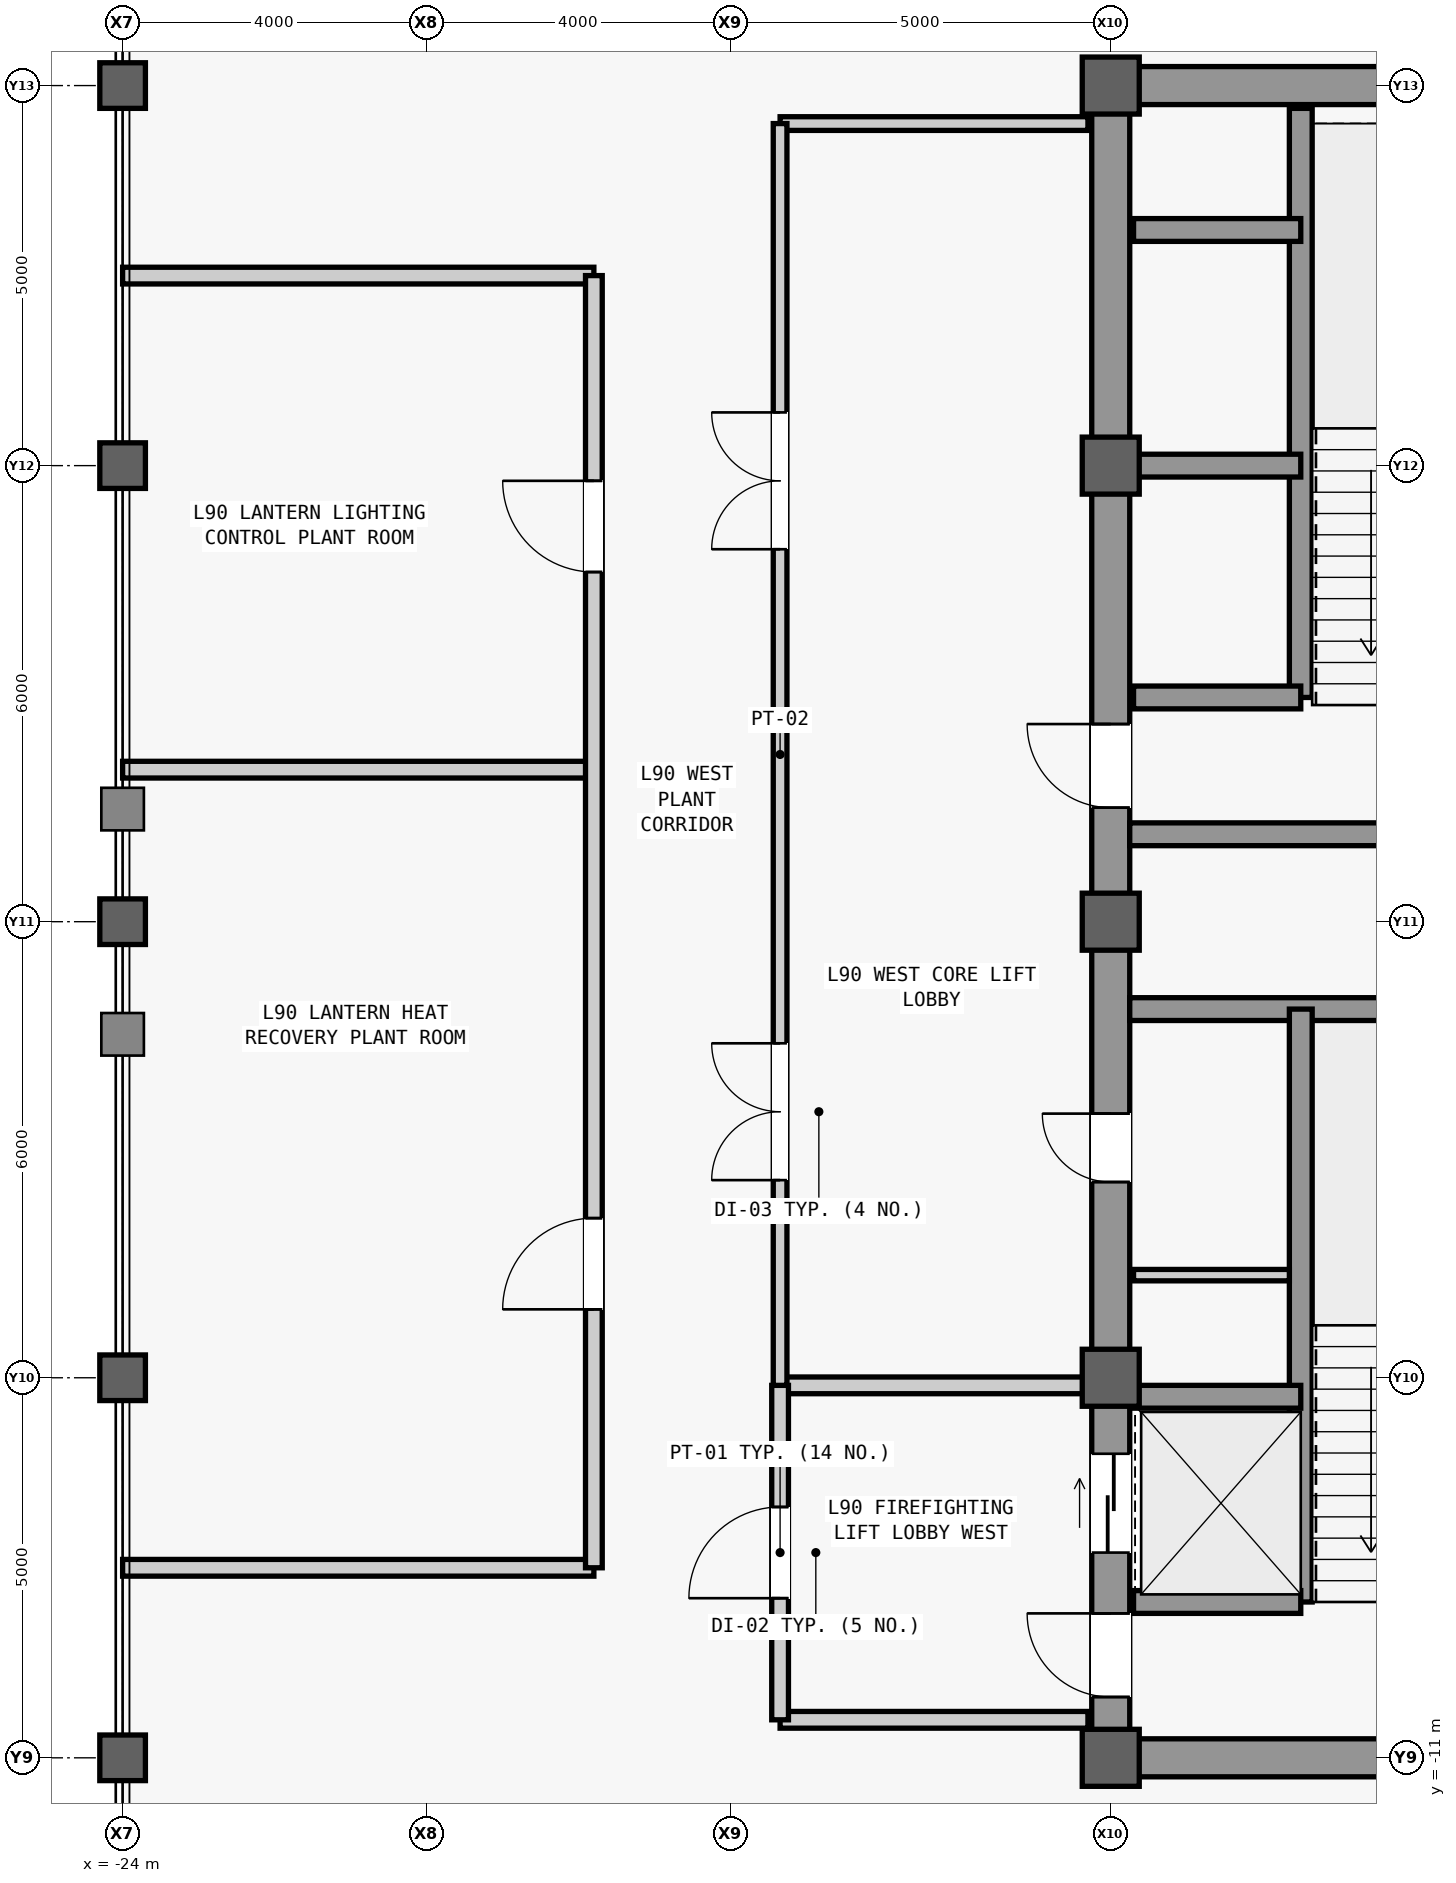
"""IFC4 building model, lengths in metres.
Left out: names, types, materials, properties, quantities, classifications, styles, units other than length and angle.
Written with IfcOpenShell. Run it as: python <this file> out.ifc"""

import sys

from ifc_helpers import new_model, si_unit, direction, frame, frame_2d, origin, origin_2d, place, context, subcontext, project, spatial, rectangle, hollow_rectangle, extrude, source, transform, mapped, element, fill, save


model = new_model("IFC4")
c1 = context("Model", 3, precision=1e-05, world=origin(), true_north=direction((0.0, 1.0)))
c2 = subcontext(c1, "Body", "Model", "MODEL_VIEW")
j1 = project(units=[si_unit("LENGTHUNIT", "METRE"), si_unit("PLANEANGLEUNIT", "RADIAN")], contexts=[c1])
p1 = place(None, origin())
s1 = spatial("IfcSite", under=j1, at=p1, CompositionType="ELEMENT")
p2 = place(p1, origin())
s2 = spatial("IfcBuilding", under=s1, at=p2, CompositionType="ELEMENT")
p3 = place(p2, frame((0.0, 0.0, 380.3)))
s3 = spatial("IfcBuildingStorey", under=s2, at=p3, CompositionType="ELEMENT", Elevation=380.3)
m1 = source(origin(), c2, "Body", "SweptSolid", [
    extrude(rectangle(XDim=22.0, YDim=0.5, at=frame_2d((11.0, 0.0))), origin(), (0.0, 0.0, 1.0), 4.45),
])
p4 = place(p3, frame((-11.0, -11.0, 0.0), z_axis=(0.0, 0.0, 1.0), x_axis=(0.0, 1.0, 0.0)))
e1 = element("IfcWall", 1, at=p4, inside=s3, PredefinedType="SHEAR", context=c2, shape_type="MappedRepresentation", body=[
    mapped(m1, transform((0.0, 0.0, 0.0), scale=1.0)),
])
m2 = source(origin(), c2, "Body", "SweptSolid", [
    extrude(rectangle(XDim=1.1, YDim=2.2, at=frame_2d((0.55, 1.1))), frame((0.0, 0.26, 0.0), z_axis=(0.0, -1.0, 0.0), x_axis=(1.0, 0.0, 0.0)), (0.0, 0.0, 1.0), 0.52),
])
p5 = place(p4, frame((0.8, 0.0, 0.0)))
e2 = element("IfcOpeningElement", 2, at=p5, cuts=e1, PredefinedType="OPENING", context=c2, shape_type="MappedRepresentation", body=[
    mapped(m2, transform((0.0, 0.0, 0.0), scale=1.0)),
])
p6 = place(p4, frame((12.5, 0.0, 0.0)))
e3 = element("IfcOpeningElement", 3, at=p6, cuts=e1, PredefinedType="OPENING", context=c2, shape_type="MappedRepresentation", body=[
    mapped(m2, transform((0.0, 0.0, 0.0), scale=1.0)),
])
m3 = source(origin(), c2, "Body", "SweptSolid", [
    extrude(rectangle(XDim=0.9, YDim=2.15, at=frame_2d((0.45, 1.075))), frame((0.0, 0.26, 0.0), z_axis=(0.0, -1.0, 0.0), x_axis=(1.0, 0.0, 0.0)), (0.0, 0.0, 1.0), 0.52),
])
p7 = place(p4, frame((7.575, 0.0, 0.0)))
e4 = element("IfcOpeningElement", 4, at=p7, cuts=e1, PredefinedType="OPENING", context=c2, shape_type="MappedRepresentation", body=[
    mapped(m3, transform((0.0, 0.0, 0.0), scale=1.0)),
])
m4 = source(origin(), c2, "Body", "SweptSolid", [
    extrude(rectangle(XDim=1.3, YDim=2.3, at=frame_2d((0.65, 1.15))), frame((0.0, 0.26, 0.0), z_axis=(0.0, -1.0, 0.0), x_axis=(1.0, 0.0, 0.0)), (0.0, 0.0, 1.0), 0.52),
])
p8 = place(p4, frame((2.7, 0.0, 0.0)))
e5 = element("IfcOpeningElement", 5, at=p8, cuts=e1, PredefinedType="OPENING", context=c2, shape_type="MappedRepresentation", body=[
    mapped(m4, transform((0.0, 0.0, 0.0), scale=1.0)),
])
m5 = source(origin(), c2, "Body", "SweptSolid", [
    extrude(rectangle(XDim=5.9, YDim=0.5, at=frame_2d((2.95, 0.0))), origin(), (0.0, 0.0, 1.0), 4.45),
])
for number, where, z_axis, x_axis in (
    (6, (-10.75, -11.0, 0.0), (0.0, 0.0, 1.0), (1.0, 0.0, 0.0)),
    (7, (-10.75, 11.0, 0.0), (0.0, 0.0, 1.0), (1.0, 0.0, 0.0)),
):
    element("IfcWall", number, at=place(p3, frame(where, z_axis=z_axis, x_axis=x_axis)), inside=s3, PredefinedType="SHEAR", context=c2, shape_type="MappedRepresentation", body=[
        mapped(m5, transform((0.0, 0.0, 0.0), scale=1.0)),
    ])
m6 = source(origin(), c2, "Body", "SweptSolid", [
    extrude(rectangle(XDim=5.65, YDim=0.3, at=frame_2d((2.825, 0.0))), origin(), (0.0, 0.0, 1.0), 4.45),
])
for number, where, z_axis, x_axis in (
    (8, (-10.75, -1.15, 0.0), (0.0, 0.0, 1.0), (1.0, 0.0, 0.0)),
    (9, (-10.75, 1.15, 0.0), (0.0, 0.0, 1.0), (1.0, 0.0, 0.0)),
):
    element("IfcWall", number, at=place(p3, frame(where, z_axis=z_axis, x_axis=x_axis)), inside=s3, PredefinedType="SHEAR", context=c2, shape_type="MappedRepresentation", body=[
        mapped(m6, transform((0.0, 0.0, 0.0), scale=1.0)),
    ])
m7 = source(origin(), c2, "Body", "SweptSolid", [
    extrude(hollow_rectangle(XDim=0.6, YDim=0.6, WallThickness=0.035, at=origin_2d()), origin(), (0.0, 0.0, 1.0), 4.8),
])
for number, where, z_axis, x_axis in (
    (10, (-24.0, -11.0, 0.0), (0.0, 0.0, 1.0), (1.0, 0.0, 0.0)),
    (11, (-24.0, -6.0, 0.0), (0.0, 0.0, 1.0), (1.0, 0.0, 0.0)),
    (12, (-24.0, 0.0, 0.0), (0.0, 0.0, 1.0), (1.0, 0.0, 0.0)),
    (13, (-24.0, 6.0, 0.0), (0.0, 0.0, 1.0), (1.0, 0.0, 0.0)),
    (14, (-24.0, 11.0, 0.0), (0.0, 0.0, 1.0), (1.0, 0.0, 0.0)),
):
    element("IfcColumn", number, at=place(p3, frame(where, z_axis=z_axis, x_axis=x_axis)), inside=s3, PredefinedType="COLUMN", context=c2, shape_type="MappedRepresentation", body=[
        mapped(m7, transform((0.0, 0.0, 0.0), scale=1.0)),
    ])
m8 = source(origin(), c2, "Body", "SweptSolid", [
    extrude(rectangle(XDim=0.75, YDim=0.75, at=origin_2d()), origin(), (0.0, 0.0, 1.0), 4.8),
])
for number, where, z_axis, x_axis in (
    (15, (-11.0, -11.0, 0.0), (0.0, 0.0, 1.0), (1.0, 0.0, 0.0)),
    (16, (-11.0, -6.0, 0.0), (0.0, 0.0, 1.0), (1.0, 0.0, 0.0)),
    (17, (-11.0, 0.0, 0.0), (0.0, 0.0, 1.0), (1.0, 0.0, 0.0)),
    (18, (-11.0, 6.0, 0.0), (0.0, 0.0, 1.0), (1.0, 0.0, 0.0)),
    (19, (-11.0, 11.0, 0.0), (0.0, 0.0, 1.0), (1.0, 0.0, 0.0)),
):
    element("IfcColumn", number, at=place(p3, frame(where, z_axis=z_axis, x_axis=x_axis)), inside=s3, PredefinedType="COLUMN", context=c2, shape_type="MappedRepresentation", body=[
        mapped(m8, transform((0.0, 0.0, 0.0), scale=1.0)),
    ])
m9 = source(origin(), c2, "Body", "SweptSolid", [
    extrude(rectangle(XDim=7.8, YDim=0.3, at=frame_2d((3.9, 0.0))), origin(), (0.0, 0.0, 1.0), 4.45),
])
p9 = place(p3, frame((-8.5, -8.95, 0.0), z_axis=(0.0, 0.0, 1.0), x_axis=(0.0, 1.0, 0.0)))
e20 = element("IfcWall", 20, at=p9, inside=s3, PredefinedType="SHEAR", context=c2, shape_type="MappedRepresentation", body=[
    mapped(m9, transform((0.0, 0.0, 0.0), scale=1.0)),
])
m10 = source(origin(), c2, "Body", "SweptSolid", [
    extrude(rectangle(XDim=2.2, YDim=0.3, at=frame_2d((1.1, 0.0))), origin(), (0.0, 0.0, 1.0), 4.45),
])
for number, where, z_axis, x_axis in (
    (21, (-10.7, -8.95, 0.0), (0.0, 0.0, 1.0), (1.0, 0.0, 0.0)),
    (22, (-10.7, -6.25, 0.0), (0.0, 0.0, 1.0), (1.0, 0.0, 0.0)),
):
    element("IfcWall", number, at=place(p3, frame(where, z_axis=z_axis, x_axis=x_axis)), inside=s3, PredefinedType="SHEAR", context=c2, shape_type="MappedRepresentation", body=[
        mapped(m10, transform((0.0, 0.0, 0.0), scale=1.0)),
    ])
m11 = source(origin(), c2, "Body", "SweptSolid", [
    extrude(rectangle(XDim=7.75, YDim=0.3, at=frame_2d((3.875, 0.0))), origin(), (0.0, 0.0, 1.0), 4.45),
])
p10 = place(p3, frame((-8.5, 2.95, 0.0), z_axis=(0.0, 0.0, 1.0), x_axis=(0.0, 1.0, 0.0)))
e23 = element("IfcWall", 23, at=p10, inside=s3, PredefinedType="SHEAR", context=c2, shape_type="MappedRepresentation", body=[
    mapped(m11, transform((0.0, 0.0, 0.0), scale=1.0)),
])
for number, where, z_axis, x_axis in (
    (24, (-10.7, 2.95, 0.0), (0.0, 0.0, 1.0), (1.0, 0.0, 0.0)),
    (25, (-10.7, 6.0, 0.0), (0.0, 0.0, 1.0), (1.0, 0.0, 0.0)),
    (26, (-10.7, 9.1, 0.0), (0.0, 0.0, 1.0), (1.0, 0.0, 0.0)),
):
    element("IfcWall", number, at=place(p3, frame(where, z_axis=z_axis, x_axis=x_axis)), inside=s3, PredefinedType="SHEAR", context=c2, shape_type="MappedRepresentation", body=[
        mapped(m10, transform((0.0, 0.0, 0.0), scale=1.0)),
    ])
m12 = source(origin(), c2, "Body", "SweptSolid", [
    extrude(rectangle(XDim=2.05, YDim=0.15, at=frame_2d((1.025, 0.0))), origin(), (0.0, 0.0, 1.0), 4.45),
])
p11 = place(p3, frame((-10.7, -4.65, 0.0), z_axis=(0.0, 0.0, 1.0), x_axis=(1.0, 0.0, 0.0)))
e27 = element("IfcWall", 27, at=p11, inside=s3, PredefinedType="PARTITIONING", context=c2, shape_type="MappedRepresentation", body=[
    mapped(m12, transform((0.0, 0.0, 0.0), scale=1.0)),
])
m13 = source(origin(), c2, "Body", "SweptSolid", [
    extrude(rectangle(XDim=4.05, YDim=0.22, at=frame_2d((2.025, 0.0))), origin(), (0.0, 0.0, 1.0), 4.45),
])
p12 = place(p3, frame((-15.35, -10.5, 0.0), z_axis=(0.0, 0.0, 1.0), x_axis=(1.0, 0.0, 0.0)))
e28 = element("IfcWall", 28, at=p12, inside=s3, PredefinedType="PARTITIONING", context=c2, shape_type="MappedRepresentation", body=[
    mapped(m13, transform((0.0, 0.0, 0.0), scale=1.0)),
])
m14 = source(origin(), c2, "Body", "SweptSolid", [
    extrude(rectangle(XDim=4.05, YDim=0.22, at=frame_2d((2.025, 0.0))), origin(), (0.0, 0.0, 1.0), 3.901),
])
p13 = place(p3, frame((-15.35, -6.1, 0.0), z_axis=(0.0, 0.0, 1.0), x_axis=(1.0, 0.0, 0.0)))
e29 = element("IfcWall", 29, at=p13, inside=s3, PredefinedType="PARTITIONING", context=c2, shape_type="MappedRepresentation", body=[
    mapped(m14, transform((0.0, 0.0, 0.0), scale=1.0)),
])
m15 = source(origin(), c2, "Body", "SweptSolid", [
    extrude(rectangle(XDim=4.4, YDim=0.22, at=frame_2d((2.2, 0.0))), origin(), (0.0, 0.0, 1.0), 4.45),
])
p14 = place(p3, frame((-15.35, -10.5, 0.0), z_axis=(0.0, 0.0, 1.0), x_axis=(0.0, 1.0, 0.0)))
e30 = element("IfcWall", 30, at=p14, inside=s3, PredefinedType="PARTITIONING", context=c2, shape_type="MappedRepresentation", body=[
    mapped(m15, transform((0.0, 0.0, 0.0), scale=1.0)),
])
m16 = source(origin(), c2, "Body", "SweptSolid", [
    extrude(rectangle(XDim=1.2, YDim=2.2, at=frame_2d((0.6, 1.1))), frame((0.0, 0.12, 0.0), z_axis=(0.0, -1.0, 0.0), x_axis=(1.0, 0.0, 0.0)), (0.0, 0.0, 1.0), 0.24),
])
p15 = place(p14, frame((1.6, 0.0, 0.0)))
e31 = element("IfcOpeningElement", 31, at=p15, cuts=e30, PredefinedType="OPENING", context=c2, shape_type="MappedRepresentation", body=[
    mapped(m16, transform((0.0, 0.0, 0.0), scale=1.0)),
])
m17 = source(origin(), c2, "Body", "SweptSolid", [
    extrude(rectangle(XDim=4.05, YDim=0.18, at=frame_2d((2.025, 0.0))), origin(), (0.0, 0.0, 1.0), 4.45),
])
p16 = place(p3, frame((-15.35, 10.5, 0.0), z_axis=(0.0, 0.0, 1.0), x_axis=(1.0, 0.0, 0.0)))
e32 = element("IfcWall", 32, at=p16, inside=s3, PredefinedType="PARTITIONING", context=c2, shape_type="MappedRepresentation", body=[
    mapped(m17, transform((0.0, 0.0, 0.0), scale=1.0)),
])
m18 = source(origin(), c2, "Body", "SweptSolid", [
    extrude(rectangle(XDim=16.6, YDim=0.18, at=frame_2d((8.3, 0.0))), origin(), (0.0, 0.0, 1.0), 4.45),
])
p17 = place(p3, frame((-15.35, -6.1, 0.0), z_axis=(0.0, 0.0, 1.0), x_axis=(0.0, 1.0, 0.0)))
e33 = element("IfcWall", 33, at=p17, inside=s3, PredefinedType="PARTITIONING", context=c2, shape_type="MappedRepresentation", body=[
    mapped(m18, transform((0.0, 0.0, 0.0), scale=1.0)),
])
m19 = source(origin(), c2, "Body", "SweptSolid", [
    extrude(rectangle(XDim=1.8, YDim=2.25, at=frame_2d((0.9, 1.125))), frame((0.0, 0.1, 0.0), z_axis=(0.0, -1.0, 0.0), x_axis=(1.0, 0.0, 0.0)), (0.0, 0.0, 1.0), 0.2),
])
p18 = place(p17, frame((2.7, 0.0, 0.0)))
e34 = element("IfcOpeningElement", 34, at=p18, cuts=e33, PredefinedType="OPENING", context=c2, shape_type="MappedRepresentation", body=[
    mapped(m19, transform((0.0, 0.0, 0.0), scale=1.0)),
])
p19 = place(p17, frame((11.0, 0.0, 0.0)))
e35 = element("IfcOpeningElement", 35, at=p19, cuts=e33, PredefinedType="OPENING", context=c2, shape_type="MappedRepresentation", body=[
    mapped(m19, transform((0.0, 0.0, 0.0), scale=1.0)),
])
m20 = source(origin(), c2, "Body", "SweptSolid", [
    extrude(rectangle(XDim=6.2, YDim=0.22, at=frame_2d((3.1, 0.0))), origin(), (0.0, 0.0, 1.0), 4.45),
])
for number, where, z_axis, x_axis in (
    (36, (-24.0, 2.0, 0.0), (0.0, 0.0, 1.0), (1.0, 0.0, 0.0)),
    (37, (-24.0, -8.5, 0.0), (0.0, 0.0, 1.0), (1.0, 0.0, 0.0)),
    (38, (-24.0, 8.5, 0.0), (0.0, 0.0, 1.0), (1.0, 0.0, 0.0)),
):
    element("IfcWall", number, at=place(p3, frame(where, z_axis=z_axis, x_axis=x_axis)), inside=s3, PredefinedType="PARTITIONING", context=c2, shape_type="MappedRepresentation", body=[
        mapped(m20, transform((0.0, 0.0, 0.0), scale=1.0)),
    ])
m21 = source(origin(), c2, "Body", "SweptSolid", [
    extrude(rectangle(XDim=17.0, YDim=0.22, at=frame_2d((8.5, 0.0))), origin(), (0.0, 0.0, 1.0), 4.45),
])
p20 = place(p3, frame((-17.8, -8.5, 0.0), z_axis=(0.0, 0.0, 1.0), x_axis=(0.0, 1.0, 0.0)))
e39 = element("IfcWall", 39, at=p20, inside=s3, PredefinedType="PARTITIONING", context=c2, shape_type="MappedRepresentation", body=[
    mapped(m21, transform((0.0, 0.0, 0.0), scale=1.0)),
])
p21 = place(p20, frame((3.4, 0.0, 0.0)))
e40 = element("IfcOpeningElement", 40, at=p21, cuts=e39, PredefinedType="OPENING", context=c2, shape_type="MappedRepresentation", body=[
    mapped(m16, transform((0.0, 0.0, 0.0), scale=1.0)),
])
p22 = place(p20, frame((13.1, 0.0, 0.0)))
e41 = element("IfcOpeningElement", 41, at=p22, cuts=e39, PredefinedType="OPENING", context=c2, shape_type="MappedRepresentation", body=[
    mapped(m16, transform((0.0, 0.0, 0.0), scale=1.0)),
])
m22 = source(origin(), c2, "Body", "SweptSolid", [
    extrude(rectangle(XDim=1.1, YDim=2.2, at=frame_2d((0.55, 1.1))), frame((0.0, 0.025, 0.0), z_axis=(0.0, -1.0, 0.0), x_axis=(1.0, 0.0, 0.0)), (0.0, 0.0, 1.0), 0.05),
])
p23 = place(p5, origin())
e42 = element("IfcDoor", 42, at=p23, inside=s3, OperationType="SINGLE_SWING_RIGHT", PredefinedType="DOOR", context=c2, shape_type="MappedRepresentation", body=[
    mapped(m22, transform((0.0, 0.0, 0.0), scale=1.0)),
])
fill(e2, e42)
p24 = place(p6, origin())
e43 = element("IfcDoor", 43, at=p24, inside=s3, OperationType="SINGLE_SWING_RIGHT", PredefinedType="DOOR", context=c2, shape_type="MappedRepresentation", body=[
    mapped(m22, transform((0.0, 0.0, 0.0), scale=1.0)),
])
fill(e3, e43)
m23 = source(origin(), c2, "Body", "SweptSolid", [
    extrude(rectangle(XDim=0.9, YDim=2.15, at=frame_2d((0.45, 1.075))), frame((0.0, 0.025, 0.0), z_axis=(0.0, -1.0, 0.0), x_axis=(1.0, 0.0, 0.0)), (0.0, 0.0, 1.0), 0.05),
])
p25 = place(p7, origin())
e44 = element("IfcDoor", 44, at=p25, inside=s3, OperationType="SINGLE_SWING_RIGHT", PredefinedType="DOOR", context=c2, shape_type="MappedRepresentation", body=[
    mapped(m23, transform((0.0, 0.0, 0.0), scale=1.0)),
])
fill(e4, e44)
m24 = source(origin(), c2, "Body", "SweptSolid", [
    extrude(rectangle(XDim=1.2, YDim=2.2, at=frame_2d((0.6, 1.1))), frame((0.0, 0.025, 0.0), z_axis=(0.0, -1.0, 0.0), x_axis=(1.0, 0.0, 0.0)), (0.0, 0.0, 1.0), 0.05),
])
p26 = place(p15, origin())
e45 = element("IfcDoor", 45, at=p26, inside=s3, OperationType="SINGLE_SWING_LEFT", PredefinedType="DOOR", context=c2, shape_type="MappedRepresentation", body=[
    mapped(m24, transform((0.0, 0.0, 0.0), scale=1.0)),
])
fill(e31, e45)
m25 = source(origin(), c2, "Body", "SweptSolid", [
    extrude(rectangle(XDim=1.8, YDim=2.25, at=frame_2d((0.9, 1.125))), frame((0.0, 0.025, 0.0), z_axis=(0.0, -1.0, 0.0), x_axis=(1.0, 0.0, 0.0)), (0.0, 0.0, 1.0), 0.05),
])
p27 = place(p18, origin())
e46 = element("IfcDoor", 46, at=p27, inside=s3, OperationType="SINGLE_SWING_LEFT", PredefinedType="DOOR", context=c2, shape_type="MappedRepresentation", body=[
    mapped(m25, transform((0.0, 0.0, 0.0), scale=1.0)),
])
fill(e34, e46)
p28 = place(p19, origin())
e47 = element("IfcDoor", 47, at=p28, inside=s3, OperationType="SINGLE_SWING_RIGHT", PredefinedType="DOOR", context=c2, shape_type="MappedRepresentation", body=[
    mapped(m25, transform((0.0, 0.0, 0.0), scale=1.0)),
])
fill(e35, e47)
p29 = place(p21, origin())
e48 = element("IfcDoor", 48, at=p29, inside=s3, OperationType="SINGLE_SWING_LEFT", PredefinedType="DOOR", context=c2, shape_type="MappedRepresentation", body=[
    mapped(m24, transform((0.0, 0.0, 0.0), scale=1.0)),
])
fill(e40, e48)
p30 = place(p22, origin())
e49 = element("IfcDoor", 49, at=p30, inside=s3, OperationType="SINGLE_SWING_RIGHT", PredefinedType="DOOR", context=c2, shape_type="MappedRepresentation", body=[
    mapped(m24, transform((0.0, 0.0, 0.0), scale=1.0)),
])
fill(e41, e49)
m26 = source(origin(), c2, "Body", "SweptSolid", [
    extrude(rectangle(XDim=1.3, YDim=2.3, at=frame_2d((0.65, 1.15))), frame((0.0, 0.025, 0.0), z_axis=(0.0, -1.0, 0.0), x_axis=(1.0, 0.0, 0.0)), (0.0, 0.0, 1.0), 0.05),
])
p31 = place(p8, origin())
e50 = element("IfcDoor", 50, at=p31, inside=s3, OperationType="SLIDING_TO_LEFT", PredefinedType="DOOR", context=c2, shape_type="MappedRepresentation", body=[
    mapped(m26, transform((0.0, 0.0, 0.0), scale=1.0)),
])
fill(e5, e50)
save(model, sys.argv[1])
